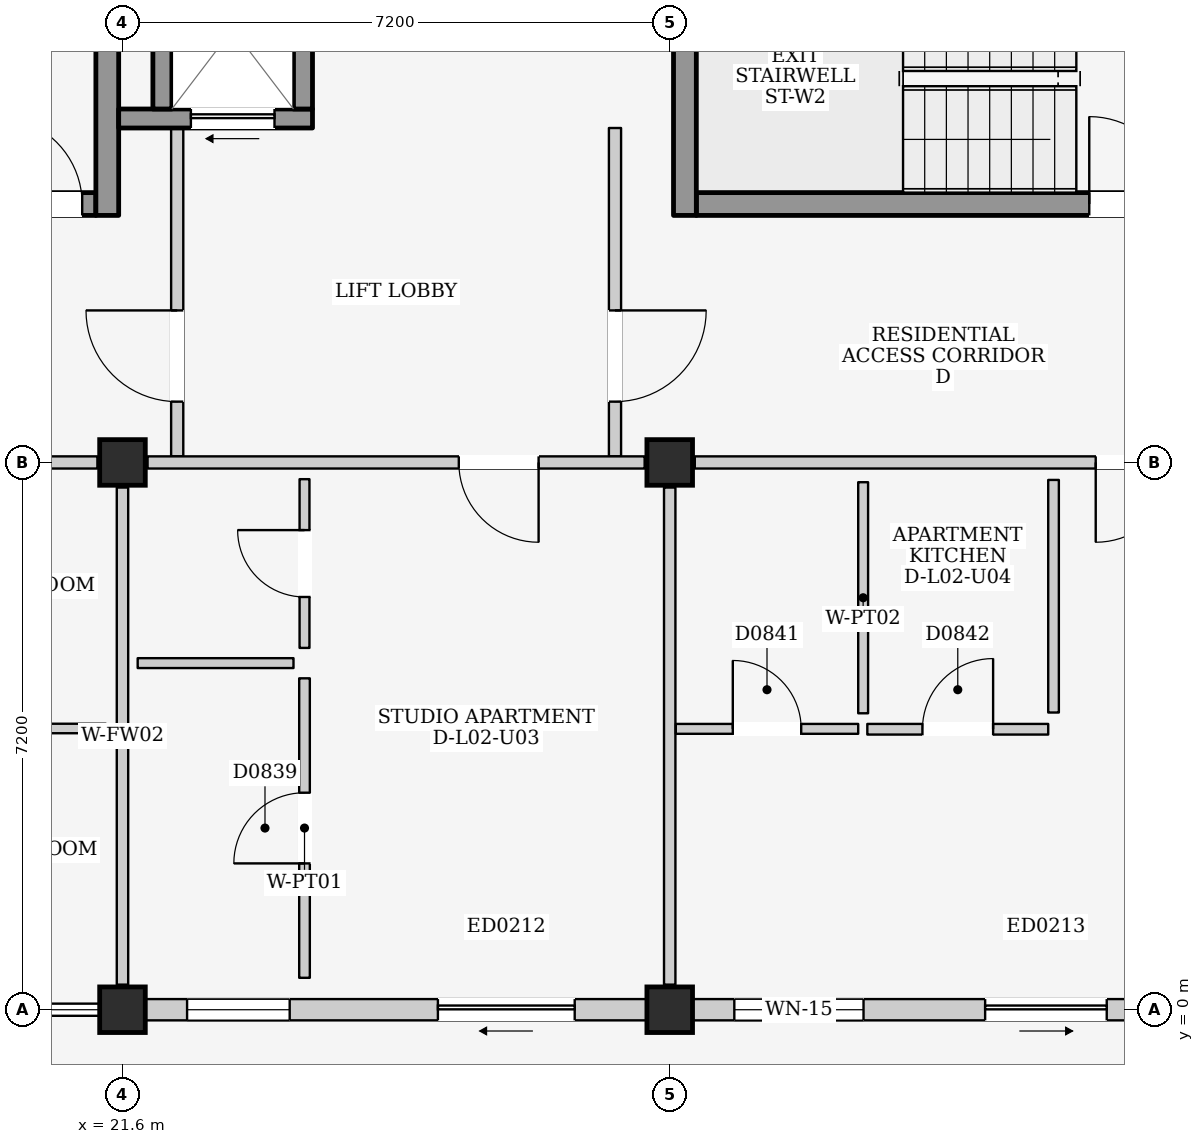
"""IFC4 building model, lengths in metres.
Left out: names, types, materials, properties, quantities, classifications, styles, units other than length and angle.
Written with IfcOpenShell. Run it as: python <this file> out.ifc"""

import sys

from ifc_helpers import new_model, si_unit, direction, frame, frame_2d, origin, origin_2d, place, context, subcontext, project, spatial, rectangle, extrude, element, fill, save


model = new_model("IFC4")
c1 = context("Model", 3, precision=1e-05, world=origin(), true_north=direction((0.0, 1.0)))
c2 = subcontext(c1, "Body", "Model", "MODEL_VIEW")
j1 = project(units=[si_unit("LENGTHUNIT", "METRE"), si_unit("PLANEANGLEUNIT", "RADIAN")], contexts=[c1])
p1 = place(None, origin())
s1 = spatial("IfcSite", under=j1, at=p1, CompositionType="ELEMENT")
p2 = place(p1, origin())
s2 = spatial("IfcBuilding", under=s1, at=p2, CompositionType="ELEMENT")
p3 = place(p2, frame((0.0, 0.0, 9.0)))
s3 = spatial("IfcBuildingStorey", under=s2, at=p3, CompositionType="ELEMENT", Elevation=9.0)
for number, where, z_axis, x_axis in (
    (1, (21.6, 0.0, 0.0), (0.0, 0.0, 1.0), (1.0, 0.0, 0.0)),
    (2, (21.6, 7.2, 0.0), (0.0, 0.0, 1.0), (1.0, 0.0, 0.0)),
    (3, (28.8, 0.0, 0.0), (0.0, 0.0, 1.0), (1.0, 0.0, 0.0)),
    (4, (28.8, 7.2, 0.0), (0.0, 0.0, 1.0), (1.0, 0.0, 0.0)),
):
    element("IfcColumn", number, at=place(p3, frame(where, z_axis=z_axis, x_axis=x_axis)), inside=s3, PredefinedType="COLUMN", context=c2, shape_type="SweptSolid", body=[
        extrude(rectangle(XDim=0.6, YDim=0.6, at=origin_2d()), origin(), (0.0, 0.0, 1.0), 3.2),
    ])
p4 = place(p3, frame((21.9, 0.0, 0.0), z_axis=(0.0, 0.0, 1.0), x_axis=(1.0, 0.0, 0.0)))
e5 = element("IfcWall", 5, at=p4, inside=s3, PredefinedType="ELEMENTEDWALL", context=c2, shape_type="SweptSolid", body=[
    extrude(rectangle(XDim=6.6, YDim=0.28, at=frame_2d((3.3, 0.0))), origin(), (0.0, 0.0, 1.0), 2.425),
])
p5 = place(p4, frame((3.85, 0.0, 0.0)))
e6 = element("IfcOpeningElement", 6, at=p5, cuts=e5, PredefinedType="OPENING", context=c2, shape_type="SweptSolid", body=[
    extrude(rectangle(XDim=1.8, YDim=2.12, at=frame_2d((0.9, 1.06))), frame((0.0, 0.155, 0.0), z_axis=(0.0, -1.0, 0.0), x_axis=(1.0, 0.0, 0.0)), (0.0, 0.0, 1.0), 0.31),
])
p6 = place(p4, frame((0.55, 0.0, 0.815)))
e7 = element("IfcOpeningElement", 7, at=p6, cuts=e5, PredefinedType="OPENING", context=c2, shape_type="SweptSolid", body=[
    extrude(rectangle(XDim=1.35, YDim=1.5, at=frame_2d((0.675, 0.75))), frame((0.0, 0.155, 0.0), z_axis=(0.0, -1.0, 0.0), x_axis=(1.0, 0.0, 0.0)), (0.0, 0.0, 1.0), 0.31),
])
p7 = place(p3, frame((29.1, 0.0, 0.0), z_axis=(0.0, 0.0, 1.0), x_axis=(1.0, 0.0, 0.0)))
e8 = element("IfcWall", 8, at=p7, inside=s3, PredefinedType="ELEMENTEDWALL", context=c2, shape_type="SweptSolid", body=[
    extrude(rectangle(XDim=6.6, YDim=0.28, at=frame_2d((3.3, 0.0))), origin(), (0.0, 0.0, 1.0), 2.425),
])
p8 = place(p7, frame((3.85, 0.0, 0.0)))
e9 = element("IfcOpeningElement", 9, at=p8, cuts=e8, PredefinedType="OPENING", context=c2, shape_type="SweptSolid", body=[
    extrude(rectangle(XDim=1.6, YDim=2.12, at=frame_2d((0.8, 1.06))), frame((0.0, 0.155, 0.0), z_axis=(0.0, -1.0, 0.0), x_axis=(1.0, 0.0, 0.0)), (0.0, 0.0, 1.0), 0.31),
])
p9 = place(p7, frame((0.55, 0.0, 0.865)))
e10 = element("IfcOpeningElement", 10, at=p9, cuts=e8, PredefinedType="OPENING", context=c2, shape_type="SweptSolid", body=[
    extrude(rectangle(XDim=1.7, YDim=1.45, at=frame_2d((0.85, 0.725))), frame((0.0, 0.155, 0.0), z_axis=(0.0, -1.0, 0.0), x_axis=(1.0, 0.0, 0.0)), (0.0, 0.0, 1.0), 0.31),
])
p10 = place(p3, frame((14.75, 10.6, 0.0), z_axis=(0.0, 0.0, 1.0), x_axis=(1.0, 0.0, 0.0)))
e11 = element("IfcWall", 11, at=p10, inside=s3, PredefinedType="SHEAR", context=c2, shape_type="SweptSolid", body=[
    extrude(rectangle(XDim=6.5, YDim=0.3, at=frame_2d((3.25, 0.0))), origin(), (0.0, 0.0, 1.0), 2.96),
])
p11 = place(p10, frame((5.17, 0.0, 0.0)))
e12 = element("IfcOpeningElement", 12, at=p11, cuts=e11, PredefinedType="OPENING", context=c2, shape_type="SweptSolid", body=[
    extrude(rectangle(XDim=1.15, YDim=2.2, at=frame_2d((0.575, 1.1))), frame((0.0, 0.165, 0.0), z_axis=(0.0, -1.0, 0.0), x_axis=(1.0, 0.0, 0.0)), (0.0, 0.0, 1.0), 0.33),
])
p12 = place(p3, frame((21.4, 10.45, 0.0), z_axis=(0.0, 0.0, 1.0), x_axis=(0.0, 1.0, 0.0)))
e13 = element("IfcWall", 13, at=p12, inside=s3, PredefinedType="SHEAR", context=c2, shape_type="SweptSolid", body=[
    extrude(rectangle(XDim=3.75, YDim=0.3, at=frame_2d((1.875, 0.0))), origin(), (0.0, 0.0, 1.0), 2.96),
])
p13 = place(p3, frame((22.32, 7.28, 0.0), z_axis=(0.0, 0.0, 1.0), x_axis=(0.0, 1.0, 0.0)))
e14 = element("IfcWall", 14, at=p13, inside=s3, PredefinedType="PARTITIONING", context=c2, shape_type="SweptSolid", body=[
    extrude(rectangle(XDim=4.32, YDim=0.16, at=frame_2d((2.16, 0.0))), origin(), (0.0, 0.0, 1.0), 2.96),
])
p14 = place(p13, frame((0.72, 0.0, 0.0)))
e15 = element("IfcOpeningElement", 15, at=p14, cuts=e14, PredefinedType="OPENING", context=c2, shape_type="SweptSolid", body=[
    extrude(rectangle(XDim=1.2, YDim=2.2, at=frame_2d((0.6, 1.1))), frame((0.0, 0.095, 0.0), z_axis=(0.0, -1.0, 0.0), x_axis=(1.0, 0.0, 0.0)), (0.0, 0.0, 1.0), 0.19),
])
p15 = place(p3, frame((28.08, 7.28, 0.0), z_axis=(0.0, 0.0, 1.0), x_axis=(0.0, 1.0, 0.0)))
e16 = element("IfcWall", 16, at=p15, inside=s3, PredefinedType="PARTITIONING", context=c2, shape_type="SweptSolid", body=[
    extrude(rectangle(XDim=4.32, YDim=0.16, at=frame_2d((2.16, 0.0))), origin(), (0.0, 0.0, 1.0), 2.96),
])
p16 = place(p15, frame((0.72, 0.0, 0.0)))
e17 = element("IfcOpeningElement", 17, at=p16, cuts=e16, PredefinedType="OPENING", context=c2, shape_type="SweptSolid", body=[
    extrude(rectangle(XDim=1.2, YDim=2.2, at=frame_2d((0.6, 1.1))), frame((0.0, 0.095, 0.0), z_axis=(0.0, -1.0, 0.0), x_axis=(1.0, 0.0, 0.0)), (0.0, 0.0, 1.0), 0.19),
])
p17 = place(p3, frame((21.55, 11.725, 0.0), z_axis=(0.0, 0.0, 1.0), x_axis=(1.0, 0.0, 0.0)))
e18 = element("IfcWall", 18, at=p17, inside=s3, PredefinedType="SHEAR", context=c2, shape_type="SweptSolid", body=[
    extrude(rectangle(XDim=2.55, YDim=0.25, at=frame_2d((1.275, 0.0))), origin(), (0.0, 0.0, 1.0), 2.96),
])
p18 = place(p17, frame((0.95, 0.0, 0.0)))
e19 = element("IfcOpeningElement", 19, at=p18, cuts=e18, PredefinedType="OPENING", context=c2, shape_type="SweptSolid", body=[
    extrude(rectangle(XDim=1.1, YDim=2.15, at=frame_2d((0.55, 1.075))), frame((0.0, 0.14, 0.0), z_axis=(0.0, -1.0, 0.0), x_axis=(1.0, 0.0, 0.0)), (0.0, 0.0, 1.0), 0.28),
])
for number, where, z_axis, x_axis in (
    (20, (22.125, 11.85, 0.0), (0.0, 0.0, 1.0), (0.0, 1.0, 0.0)),
    (21, (23.975, 11.85, 0.0), (0.0, 0.0, 1.0), (0.0, 1.0, 0.0)),
):
    element("IfcWall", number, at=place(p3, frame(where, z_axis=z_axis, x_axis=x_axis)), inside=s3, PredefinedType="SHEAR", context=c2, shape_type="SweptSolid", body=[
        extrude(rectangle(XDim=2.1, YDim=0.25, at=frame_2d((1.05, 0.0))), origin(), (0.0, 0.0, 1.0), 2.96),
    ])
p19 = place(p3, frame((29.15, 10.6, 0.0), z_axis=(0.0, 0.0, 1.0), x_axis=(1.0, 0.0, 0.0)))
e22 = element("IfcWall", 22, at=p19, inside=s3, PredefinedType="SHEAR", context=c2, shape_type="SweptSolid", body=[
    extrude(rectangle(XDim=6.5, YDim=0.3, at=frame_2d((3.25, 0.0))), origin(), (0.0, 0.0, 1.0), 2.96),
])
p20 = place(p19, frame((5.17, 0.0, 0.0)))
e23 = element("IfcOpeningElement", 23, at=p20, cuts=e22, PredefinedType="OPENING", context=c2, shape_type="SweptSolid", body=[
    extrude(rectangle(XDim=1.15, YDim=2.2, at=frame_2d((0.575, 1.1))), frame((0.0, 0.165, 0.0), z_axis=(0.0, -1.0, 0.0), x_axis=(1.0, 0.0, 0.0)), (0.0, 0.0, 1.0), 0.33),
])
p21 = place(p3, frame((29.0, 10.45, 0.0), z_axis=(0.0, 0.0, 1.0), x_axis=(0.0, 1.0, 0.0)))
e24 = element("IfcWall", 24, at=p21, inside=s3, PredefinedType="SHEAR", context=c2, shape_type="SweptSolid", body=[
    extrude(rectangle(XDim=3.6, YDim=0.3, at=frame_2d((1.8, 0.0))), origin(), (0.0, 0.0, 1.0), 2.96),
])
p22 = place(p3, frame((14.73, 7.2, 0.0), z_axis=(0.0, 0.0, 1.0), x_axis=(1.0, 0.0, 0.0)))
e25 = element("IfcWall", 25, at=p22, inside=s3, PredefinedType="PARTITIONING", context=c2, shape_type="SweptSolid", body=[
    extrude(rectangle(XDim=6.54, YDim=0.16, at=frame_2d((3.27, 0.0))), origin(), (0.0, 0.0, 1.0), 2.345),
])
p23 = place(p3, frame((21.6, 0.33, 0.0), z_axis=(0.0, 0.0, 1.0), x_axis=(0.0, 1.0, 0.0)))
e26 = element("IfcWall", 26, at=p23, inside=s3, PredefinedType="PARTITIONING", context=c2, shape_type="SweptSolid", body=[
    extrude(rectangle(XDim=6.54, YDim=0.15, at=frame_2d((3.27, 0.0))), origin(), (0.0, 0.0, 1.0), 2.395),
])
p24 = place(p3, frame((17.32, 3.7, 0.0), z_axis=(0.0, 0.0, 1.0), x_axis=(1.0, 0.0, 0.0)))
e27 = element("IfcWall", 27, at=p24, inside=s3, PredefinedType="PARTITIONING", context=c2, shape_type="SweptSolid", body=[
    extrude(rectangle(XDim=4.06, YDim=0.125, at=frame_2d((2.03, 0.0))), origin(), (0.0, 0.0, 1.0), 2.96),
])
p25 = place(p3, frame((21.93, 7.2, 0.0), z_axis=(0.0, 0.0, 1.0), x_axis=(1.0, 0.0, 0.0)))
e28 = element("IfcWall", 28, at=p25, inside=s3, PredefinedType="PARTITIONING", context=c2, shape_type="SweptSolid", body=[
    extrude(rectangle(XDim=6.54, YDim=0.16, at=frame_2d((3.27, 0.0))), origin(), (0.0, 0.0, 1.0), 2.345),
])
p26 = place(p25, frame((4.095, 0.0, 0.0)))
e29 = element("IfcOpeningElement", 29, at=p26, cuts=e28, PredefinedType="OPENING", context=c2, shape_type="SweptSolid", body=[
    extrude(rectangle(XDim=1.05, YDim=2.15, at=frame_2d((0.525, 1.075))), frame((0.0, 0.095, 0.0), z_axis=(0.0, -1.0, 0.0), x_axis=(1.0, 0.0, 0.0)), (0.0, 0.0, 1.0), 0.19),
])
p27 = place(p3, frame((28.8, 0.33, 0.0), z_axis=(0.0, 0.0, 1.0), x_axis=(0.0, 1.0, 0.0)))
e30 = element("IfcWall", 30, at=p27, inside=s3, PredefinedType="PARTITIONING", context=c2, shape_type="SweptSolid", body=[
    extrude(rectangle(XDim=6.54, YDim=0.15, at=frame_2d((3.27, 0.0))), origin(), (0.0, 0.0, 1.0), 2.395),
])
p28 = place(p3, frame((21.8, 4.56, 0.0), z_axis=(0.0, 0.0, 1.0), x_axis=(1.0, 0.0, 0.0)))
e31 = element("IfcWall", 31, at=p28, inside=s3, PredefinedType="PARTITIONING", context=c2, shape_type="SweptSolid", body=[
    extrude(rectangle(XDim=2.05, YDim=0.13, at=frame_2d((1.025, 0.0))), origin(), (0.0, 0.0, 1.0), 2.96),
])
p29 = place(p3, frame((23.995, 4.76, 0.0), z_axis=(0.0, 0.0, 1.0), x_axis=(0.0, 1.0, 0.0)))
e32 = element("IfcWall", 32, at=p29, inside=s3, PredefinedType="PARTITIONING", context=c2, shape_type="SweptSolid", body=[
    extrude(rectangle(XDim=2.22, YDim=0.13, at=frame_2d((1.11, 0.0))), origin(), (0.0, 0.0, 1.0), 2.96),
])
p30 = place(p29, frame((0.67, 0.0, 0.0)))
e33 = element("IfcOpeningElement", 33, at=p30, cuts=e32, PredefinedType="OPENING", context=c2, shape_type="SweptSolid", body=[
    extrude(rectangle(XDim=0.88, YDim=2.1, at=frame_2d((0.44, 1.05))), frame((0.0, 0.08, 0.0), z_axis=(0.0, -1.0, 0.0), x_axis=(1.0, 0.0, 0.0)), (0.0, 0.0, 1.0), 0.16),
])
p31 = place(p3, frame((23.995, 0.42, 0.0), z_axis=(0.0, 0.0, 1.0), x_axis=(0.0, 1.0, 0.0)))
e34 = element("IfcWall", 34, at=p31, inside=s3, PredefinedType="PARTITIONING", context=c2, shape_type="SweptSolid", body=[
    extrude(rectangle(XDim=3.94, YDim=0.14, at=frame_2d((1.97, 0.0))), origin(), (0.0, 0.0, 1.0), 2.96),
])
p32 = place(p31, frame((1.505, 0.0, 0.0)))
e35 = element("IfcOpeningElement", 35, at=p32, cuts=e34, PredefinedType="OPENING", context=c2, shape_type="SweptSolid", body=[
    extrude(rectangle(XDim=0.93, YDim=2.14, at=frame_2d((0.465, 1.07))), frame((0.0, 0.085, 0.0), z_axis=(0.0, -1.0, 0.0), x_axis=(1.0, 0.0, 0.0)), (0.0, 0.0, 1.0), 0.17),
])
p33 = place(p3, frame((29.13, 7.2, 0.0), z_axis=(0.0, 0.0, 1.0), x_axis=(1.0, 0.0, 0.0)))
e36 = element("IfcWall", 36, at=p33, inside=s3, PredefinedType="PARTITIONING", context=c2, shape_type="SweptSolid", body=[
    extrude(rectangle(XDim=6.54, YDim=0.16, at=frame_2d((3.27, 0.0))), origin(), (0.0, 0.0, 1.0), 2.345),
])
p34 = place(p33, frame((5.275, 0.0, 0.0)))
e37 = element("IfcOpeningElement", 37, at=p34, cuts=e36, PredefinedType="OPENING", context=c2, shape_type="SweptSolid", body=[
    extrude(rectangle(XDim=1.05, YDim=2.15, at=frame_2d((0.525, 1.075))), frame((0.0, 0.095, 0.0), z_axis=(0.0, -1.0, 0.0), x_axis=(1.0, 0.0, 0.0)), (0.0, 0.0, 1.0), 0.19),
])
p35 = place(p3, frame((28.88, 3.695, 0.0), z_axis=(0.0, 0.0, 1.0), x_axis=(1.0, 0.0, 0.0)))
e38 = element("IfcWall", 38, at=p35, inside=s3, PredefinedType="PARTITIONING", context=c2, shape_type="SweptSolid", body=[
    extrude(rectangle(XDim=2.4, YDim=0.13, at=frame_2d((1.2, 0.0))), origin(), (0.0, 0.0, 1.0), 2.96),
])
p36 = place(p35, frame((0.75, 0.0, 0.0)))
e39 = element("IfcOpeningElement", 39, at=p36, cuts=e38, PredefinedType="OPENING", context=c2, shape_type="SweptSolid", body=[
    extrude(rectangle(XDim=0.9, YDim=2.1, at=frame_2d((0.45, 1.05))), frame((0.0, 0.08, 0.0), z_axis=(0.0, -1.0, 0.0), x_axis=(1.0, 0.0, 0.0)), (0.0, 0.0, 1.0), 0.16),
])
p37 = place(p3, frame((31.345, 3.9, 0.0), z_axis=(0.0, 0.0, 1.0), x_axis=(0.0, 1.0, 0.0)))
e40 = element("IfcWall", 40, at=p37, inside=s3, PredefinedType="PARTITIONING", context=c2, shape_type="SweptSolid", body=[
    extrude(rectangle(XDim=3.04, YDim=0.13, at=frame_2d((1.52, 0.0))), origin(), (0.0, 0.0, 1.0), 2.96),
])
p38 = place(p3, frame((31.4, 3.69, 0.0), z_axis=(0.0, 0.0, 1.0), x_axis=(1.0, 0.0, 0.0)))
e41 = element("IfcWall", 41, at=p38, inside=s3, PredefinedType="PARTITIONING", context=c2, shape_type="SweptSolid", body=[
    extrude(rectangle(XDim=2.38, YDim=0.14, at=frame_2d((1.19, 0.0))), origin(), (0.0, 0.0, 1.0), 2.96),
])
p39 = place(p38, frame((0.725, 0.0, 0.0)))
e42 = element("IfcOpeningElement", 42, at=p39, cuts=e41, PredefinedType="OPENING", context=c2, shape_type="SweptSolid", body=[
    extrude(rectangle(XDim=0.93, YDim=2.14, at=frame_2d((0.465, 1.07))), frame((0.0, 0.085, 0.0), z_axis=(0.0, -1.0, 0.0), x_axis=(1.0, 0.0, 0.0)), (0.0, 0.0, 1.0), 0.17),
])
p40 = place(p3, frame((33.85, 3.91, 0.0), z_axis=(0.0, 0.0, 1.0), x_axis=(0.0, 1.0, 0.0)))
e43 = element("IfcWall", 43, at=p40, inside=s3, PredefinedType="PARTITIONING", context=c2, shape_type="SweptSolid", body=[
    extrude(rectangle(XDim=3.06, YDim=0.14, at=frame_2d((1.53, 0.0))), origin(), (0.0, 0.0, 1.0), 2.96),
])
p41 = place(p5, frame((1.8, 0.0, 0.0), z_axis=(0.0, 0.0, 1.0), x_axis=(-1.0, 0.0, 0.0)))
e44 = element("IfcDoor", 44, at=p41, inside=s3, OperationType="SLIDING_TO_LEFT", PredefinedType="DOOR", context=c2, shape_type="SweptSolid", body=[
    extrude(rectangle(XDim=1.8, YDim=2.12, at=frame_2d((0.9, 1.06))), frame((0.0, 0.025, 0.0), z_axis=(0.0, -1.0, 0.0), x_axis=(1.0, 0.0, 0.0)), (0.0, 0.0, 1.0), 0.05),
])
fill(e6, e44)
p42 = place(p6, origin())
e45 = element("IfcWindow", 45, at=p42, inside=s3, PartitioningType="SINGLE_PANEL", PredefinedType="WINDOW", context=c2, shape_type="SweptSolid", body=[
    extrude(rectangle(XDim=1.35, YDim=1.5, at=frame_2d((0.675, 0.75))), frame((0.0, 0.03, 0.0), z_axis=(0.0, -1.0, 0.0), x_axis=(1.0, 0.0, 0.0)), (0.0, 0.0, 1.0), 0.06),
])
fill(e7, e45)
p43 = place(p8, frame((1.6, 0.0, 0.0), z_axis=(0.0, 0.0, 1.0), x_axis=(-1.0, 0.0, 0.0)))
e46 = element("IfcDoor", 46, at=p43, inside=s3, OperationType="SLIDING_TO_RIGHT", PredefinedType="DOOR", context=c2, shape_type="SweptSolid", body=[
    extrude(rectangle(XDim=1.6, YDim=2.12, at=frame_2d((0.8, 1.06))), frame((0.0, 0.025, 0.0), z_axis=(0.0, -1.0, 0.0), x_axis=(1.0, 0.0, 0.0)), (0.0, 0.0, 1.0), 0.05),
])
fill(e9, e46)
p44 = place(p9, origin())
e47 = element("IfcWindow", 47, at=p44, inside=s3, PartitioningType="DOUBLE_PANEL_VERTICAL", PredefinedType="WINDOW", context=c2, shape_type="SweptSolid", body=[
    extrude(rectangle(XDim=1.7, YDim=1.45, at=frame_2d((0.85, 0.725))), frame((0.0, 0.03, 0.0), z_axis=(0.0, -1.0, 0.0), x_axis=(1.0, 0.0, 0.0)), (0.0, 0.0, 1.0), 0.06),
])
fill(e10, e47)
p45 = place(p11, origin())
e48 = element("IfcDoor", 48, at=p45, inside=s3, OperationType="SINGLE_SWING_LEFT", PredefinedType="DOOR", context=c2, shape_type="SweptSolid", body=[
    extrude(rectangle(XDim=1.15, YDim=2.2, at=frame_2d((0.575, 1.1))), frame((0.0, 0.025, 0.0), z_axis=(0.0, -1.0, 0.0), x_axis=(1.0, 0.0, 0.0)), (0.0, 0.0, 1.0), 0.05),
])
fill(e12, e48)
p46 = place(p14, origin())
e49 = element("IfcDoor", 49, at=p46, inside=s3, OperationType="SINGLE_SWING_RIGHT", PredefinedType="DOOR", context=c2, shape_type="SweptSolid", body=[
    extrude(rectangle(XDim=1.2, YDim=2.2, at=frame_2d((0.6, 1.1))), frame((0.0, 0.025, 0.0), z_axis=(0.0, -1.0, 0.0), x_axis=(1.0, 0.0, 0.0)), (0.0, 0.0, 1.0), 0.05),
])
fill(e15, e49)
p47 = place(p16, frame((1.2, 0.0, 0.0), z_axis=(0.0, 0.0, 1.0), x_axis=(-1.0, 0.0, 0.0)))
e50 = element("IfcDoor", 50, at=p47, inside=s3, OperationType="SINGLE_SWING_LEFT", PredefinedType="DOOR", context=c2, shape_type="SweptSolid", body=[
    extrude(rectangle(XDim=1.2, YDim=2.2, at=frame_2d((0.6, 1.1))), frame((0.0, 0.025, 0.0), z_axis=(0.0, -1.0, 0.0), x_axis=(1.0, 0.0, 0.0)), (0.0, 0.0, 1.0), 0.05),
])
fill(e17, e50)
p48 = place(p18, frame((1.1, 0.0, 0.0), z_axis=(0.0, 0.0, 1.0), x_axis=(-1.0, 0.0, 0.0)))
e51 = element("IfcDoor", 51, at=p48, inside=s3, OperationType="SLIDING_TO_LEFT", PredefinedType="DOOR", context=c2, shape_type="SweptSolid", body=[
    extrude(rectangle(XDim=1.1, YDim=2.15, at=frame_2d((0.55, 1.075))), frame((0.0, 0.025, 0.0), z_axis=(0.0, -1.0, 0.0), x_axis=(1.0, 0.0, 0.0)), (0.0, 0.0, 1.0), 0.05),
])
fill(e19, e51)
p49 = place(p20, origin())
e52 = element("IfcDoor", 52, at=p49, inside=s3, OperationType="SINGLE_SWING_LEFT", PredefinedType="DOOR", context=c2, shape_type="SweptSolid", body=[
    extrude(rectangle(XDim=1.15, YDim=2.2, at=frame_2d((0.575, 1.1))), frame((0.0, 0.025, 0.0), z_axis=(0.0, -1.0, 0.0), x_axis=(1.0, 0.0, 0.0)), (0.0, 0.0, 1.0), 0.05),
])
fill(e23, e52)
p50 = place(p26, frame((1.05, 0.0, 0.0), z_axis=(0.0, 0.0, 1.0), x_axis=(-1.0, 0.0, 0.0)))
e53 = element("IfcDoor", 53, at=p50, inside=s3, OperationType="SINGLE_SWING_LEFT", PredefinedType="DOOR", context=c2, shape_type="SweptSolid", body=[
    extrude(rectangle(XDim=1.05, YDim=2.15, at=frame_2d((0.525, 1.075))), frame((0.0, 0.025, 0.0), z_axis=(0.0, -1.0, 0.0), x_axis=(1.0, 0.0, 0.0)), (0.0, 0.0, 1.0), 0.05),
])
fill(e29, e53)
p51 = place(p30, origin())
e54 = element("IfcDoor", 54, at=p51, inside=s3, OperationType="SINGLE_SWING_RIGHT", PredefinedType="DOOR", context=c2, shape_type="SweptSolid", body=[
    extrude(rectangle(XDim=0.88, YDim=2.1, at=frame_2d((0.44, 1.05))), frame((0.0, 0.025, 0.0), z_axis=(0.0, -1.0, 0.0), x_axis=(1.0, 0.0, 0.0)), (0.0, 0.0, 1.0), 0.05),
])
fill(e33, e54)
p52 = place(p32, origin())
e55 = element("IfcDoor", 55, at=p52, inside=s3, OperationType="SINGLE_SWING_LEFT", PredefinedType="DOOR", context=c2, shape_type="SweptSolid", body=[
    extrude(rectangle(XDim=0.93, YDim=2.14, at=frame_2d((0.465, 1.07))), frame((0.0, 0.025, 0.0), z_axis=(0.0, -1.0, 0.0), x_axis=(1.0, 0.0, 0.0)), (0.0, 0.0, 1.0), 0.05),
])
fill(e35, e55)
p53 = place(p34, frame((1.05, 0.0, 0.0), z_axis=(0.0, 0.0, 1.0), x_axis=(-1.0, 0.0, 0.0)))
e56 = element("IfcDoor", 56, at=p53, inside=s3, OperationType="SINGLE_SWING_RIGHT", PredefinedType="DOOR", context=c2, shape_type="SweptSolid", body=[
    extrude(rectangle(XDim=1.05, YDim=2.15, at=frame_2d((0.525, 1.075))), frame((0.0, 0.025, 0.0), z_axis=(0.0, -1.0, 0.0), x_axis=(1.0, 0.0, 0.0)), (0.0, 0.0, 1.0), 0.05),
])
fill(e37, e56)
p54 = place(p36, origin())
e57 = element("IfcDoor", 57, at=p54, inside=s3, OperationType="SINGLE_SWING_LEFT", PredefinedType="DOOR", context=c2, shape_type="SweptSolid", body=[
    extrude(rectangle(XDim=0.9, YDim=2.1, at=frame_2d((0.45, 1.05))), frame((0.0, 0.025, 0.0), z_axis=(0.0, -1.0, 0.0), x_axis=(1.0, 0.0, 0.0)), (0.0, 0.0, 1.0), 0.05),
])
fill(e39, e57)
p55 = place(p39, origin())
e58 = element("IfcDoor", 58, at=p55, inside=s3, OperationType="SINGLE_SWING_RIGHT", PredefinedType="DOOR", context=c2, shape_type="SweptSolid", body=[
    extrude(rectangle(XDim=0.93, YDim=2.14, at=frame_2d((0.465, 1.07))), frame((0.0, 0.025, 0.0), z_axis=(0.0, -1.0, 0.0), x_axis=(1.0, 0.0, 0.0)), (0.0, 0.0, 1.0), 0.05),
])
fill(e42, e58)
save(model, sys.argv[1])
